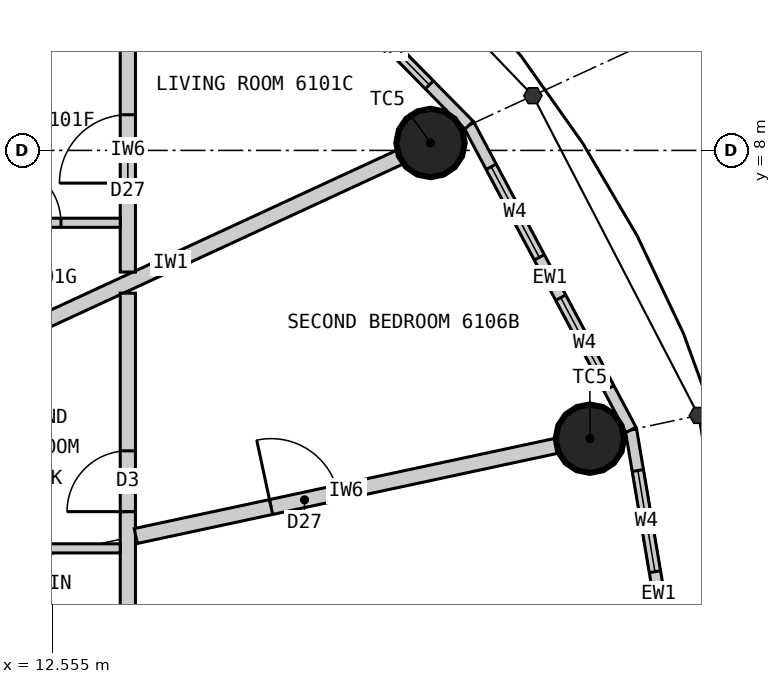
"""IFC4 building model, lengths in metres.
Left out: names, types, materials, properties, quantities, classifications, styles, units other than length and angle.
Written with IfcOpenShell. Run it as: python <this file> out.ifc"""

import sys

from ifc_helpers import new_model, si_unit, direction, frame, frame_2d, origin, origin_2d, place, context, subcontext, project, spatial, rectangle, circle, extrude, element, fill, save


model = new_model("IFC4")
c1 = context("Model", 3, precision=1e-05, world=origin(), true_north=direction((0.0, 1.0)))
c2 = subcontext(c1, "Body", "Model", "MODEL_VIEW")
j1 = project(units=[si_unit("LENGTHUNIT", "METRE"), si_unit("PLANEANGLEUNIT", "RADIAN")], contexts=[c1])
p1 = place(None, origin())
s1 = spatial("IfcSite", under=j1, at=p1, CompositionType="ELEMENT")
p2 = place(p1, origin())
s2 = spatial("IfcBuilding", under=s1, at=p2, CompositionType="ELEMENT")
p3 = place(p2, frame((0.0, 0.0, 225.9)))
s3 = spatial("IfcBuildingStorey", under=s2, at=p3, CompositionType="ELEMENT", Elevation=225.9)
for number, where, z_axis, x_axis in (
    (1, (19.629, 4.208, 0.0), (0.0, 0.0, 1.0), (1.0, 0.0, 0.0)),
    (2, (17.532, 8.098, 0.0), (0.0, 0.0, 1.0), (1.0, 0.0, 0.0)),
):
    element("IfcColumn", number, at=place(p3, frame(where, z_axis=z_axis, x_axis=x_axis)), inside=s3, PredefinedType="COLUMN", context=c2, shape_type="SweptSolid", body=[
        extrude(circle(Radius=0.45, at=origin_2d()), origin(), (0.0, 0.0, 1.0), 3.3),
    ])
p4 = place(p3, frame((20.9, 0.0, 0.0), z_axis=(0.0, 0.0, 1.0), x_axis=(-0.166538513568, 0.986034950445, 0.0)))
e3 = element("IfcWall", 3, at=p4, inside=s3, PredefinedType="ELEMENTEDWALL", context=c2, shape_type="SweptSolid", body=[
    extrude(rectangle(XDim=4.385, YDim=0.15, at=frame_2d((2.192, 0.0))), origin(), (0.0, 0.0, 1.0), 3.12),
])
p5 = place(p4, frame((0.542, 0.0, 0.9)))
e4 = element("IfcOpeningElement", 4, at=p5, cuts=e3, PredefinedType="OPENING", context=c2, shape_type="SweptSolid", body=[
    extrude(rectangle(XDim=1.35, YDim=1.9, at=frame_2d((0.675, 0.95))), frame((0.0, 0.085, 0.0), z_axis=(0.0, -1.0, 0.0), x_axis=(1.0, 0.0, 0.0)), (0.0, 0.0, 1.0), 0.17),
])
p6 = place(p4, frame((2.492, 0.0, 0.9)))
e5 = element("IfcOpeningElement", 5, at=p6, cuts=e3, PredefinedType="OPENING", context=c2, shape_type="SweptSolid", body=[
    extrude(rectangle(XDim=1.35, YDim=1.9, at=frame_2d((0.675, 0.95))), frame((0.0, 0.085, 0.0), z_axis=(0.0, -1.0, 0.0), x_axis=(1.0, 0.0, 0.0)), (0.0, 0.0, 1.0), 0.17),
])
p7 = place(p3, frame((20.17, 4.323, 0.0), z_axis=(0.0, 0.0, 1.0), x_axis=(-0.469256152955, 0.883062094597, 0.0)))
e6 = element("IfcWall", 6, at=p7, inside=s3, PredefinedType="ELEMENTEDWALL", context=c2, shape_type="SweptSolid", body=[
    extrude(rectangle(XDim=4.539, YDim=0.15, at=frame_2d((2.27, 0.0))), origin(), (0.0, 0.0, 1.0), 3.12),
])
p8 = place(p7, frame((0.62, 0.0, 0.9)))
e7 = element("IfcOpeningElement", 7, at=p8, cuts=e6, PredefinedType="OPENING", context=c2, shape_type="SweptSolid", body=[
    extrude(rectangle(XDim=1.35, YDim=1.9, at=frame_2d((0.675, 0.95))), frame((0.0, 0.085, 0.0), z_axis=(0.0, -1.0, 0.0), x_axis=(1.0, 0.0, 0.0)), (0.0, 0.0, 1.0), 0.17),
])
p9 = place(p7, frame((2.57, 0.0, 0.9)))
e8 = element("IfcOpeningElement", 8, at=p9, cuts=e6, PredefinedType="OPENING", context=c2, shape_type="SweptSolid", body=[
    extrude(rectangle(XDim=1.35, YDim=1.9, at=frame_2d((0.675, 0.95))), frame((0.0, 0.085, 0.0), z_axis=(0.0, -1.0, 0.0), x_axis=(1.0, 0.0, 0.0)), (0.0, 0.0, 1.0), 0.17),
])
p10 = place(p3, frame((18.04, 8.332, 0.0), z_axis=(0.0, 0.0, 1.0), x_axis=(-0.701527379618, 0.712642501993, 0.0)))
e9 = element("IfcWall", 9, at=p10, inside=s3, PredefinedType="ELEMENTEDWALL", context=c2, shape_type="SweptSolid", body=[
    extrude(rectangle(XDim=4.788, YDim=0.15, at=frame_2d((2.394, 0.0))), origin(), (0.0, 0.0, 1.0), 3.12),
])
p11 = place(p10, frame((0.744, 0.0, 0.9)))
e10 = element("IfcOpeningElement", 10, at=p11, cuts=e9, PredefinedType="OPENING", context=c2, shape_type="SweptSolid", body=[
    extrude(rectangle(XDim=1.35, YDim=1.9, at=frame_2d((0.675, 0.95))), frame((0.0, 0.085, 0.0), z_axis=(0.0, -1.0, 0.0), x_axis=(1.0, 0.0, 0.0)), (0.0, 0.0, 1.0), 0.17),
])
p12 = place(p10, frame((2.694, 0.0, 0.9)))
e11 = element("IfcOpeningElement", 11, at=p12, cuts=e9, PredefinedType="OPENING", context=c2, shape_type="SweptSolid", body=[
    extrude(rectangle(XDim=1.35, YDim=1.9, at=frame_2d((0.675, 0.95))), frame((0.0, 0.085, 0.0), z_axis=(0.0, -1.0, 0.0), x_axis=(1.0, 0.0, 0.0)), (0.0, 0.0, 1.0), 0.17),
])
p13 = place(p3, frame((11.1, 5.127, 0.0), z_axis=(0.0, 0.0, 1.0), x_axis=(0.907840886552, 0.419314827672, 0.0)))
e12 = element("IfcWall", 12, at=p13, inside=s3, PredefinedType="PARTITIONING", context=c2, shape_type="SweptSolid", body=[
    extrude(rectangle(XDim=6.635, YDim=0.2, at=frame_2d((3.318, 0.0))), origin(), (0.0, 0.0, 1.0), 2.32),
])
p14 = place(p3, frame((13.55, 6.4, 0.0), z_axis=(0.0, 0.0, 1.0), x_axis=(0.0, 1.0, 0.0)))
e13 = element("IfcWall", 13, at=p14, inside=s3, PredefinedType="PARTITIONING", context=c2, shape_type="SweptSolid", body=[
    extrude(rectangle(XDim=3.209, YDim=0.2, at=frame_2d((1.604, 0.0))), origin(), (0.0, 0.0, 1.0), 3.12),
])
p15 = place(p14, frame((1.17, 0.0, 0.0)))
e14 = element("IfcOpeningElement", 14, at=p15, cuts=e13, PredefinedType="OPENING", context=c2, shape_type="SweptSolid", body=[
    extrude(rectangle(XDim=0.9, YDim=2.1, at=frame_2d((0.45, 1.05))), frame((0.0, 0.11, 0.0), z_axis=(0.0, -1.0, 0.0), x_axis=(1.0, 0.0, 0.0)), (0.0, 0.0, 1.0), 0.22),
])
p16 = place(p3, frame((11.1, 7.048, 0.0), z_axis=(0.0, 0.0, 1.0), x_axis=(1.0, 0.0, 0.0)))
e15 = element("IfcWall", 15, at=p16, inside=s3, PredefinedType="PARTITIONING", context=c2, shape_type="SweptSolid", body=[
    extrude(rectangle(XDim=2.35, YDim=0.12, at=frame_2d((1.175, 0.0))), origin(), (0.0, 0.0, 1.0), 3.12),
])
p17 = place(p16, frame((0.77, 0.0, 0.0)))
e16 = element("IfcOpeningElement", 16, at=p17, cuts=e15, PredefinedType="OPENING", context=c2, shape_type="SweptSolid", body=[
    extrude(rectangle(XDim=0.8, YDim=2.1, at=frame_2d((0.4, 1.05))), frame((0.0, 0.07, 0.0), z_axis=(0.0, -1.0, 0.0), x_axis=(1.0, 0.0, 0.0)), (0.0, 0.0, 1.0), 0.14),
])
p18 = place(p3, frame((13.55, -6.122, 0.0), z_axis=(0.0, 0.0, 1.0), x_axis=(0.0, 1.0, 0.0)))
e17 = element("IfcWall", 17, at=p18, inside=s3, PredefinedType="PARTITIONING", context=c2, shape_type="SweptSolid", body=[
    extrude(rectangle(XDim=12.245, YDim=0.2, at=frame_2d((6.122, 0.0))), origin(), (0.0, 0.0, 1.0), 3.12),
])
p19 = place(p18, frame((2.07, 0.0, 0.0)))
e18 = element("IfcOpeningElement", 18, at=p19, cuts=e17, PredefinedType="OPENING", context=c2, shape_type="SweptSolid", body=[
    extrude(rectangle(XDim=0.8, YDim=2.1, at=frame_2d((0.4, 1.05))), frame((0.0, 0.11, 0.0), z_axis=(0.0, -1.0, 0.0), x_axis=(1.0, 0.0, 0.0)), (0.0, 0.0, 1.0), 0.22),
])
p20 = place(p18, frame((9.37, 0.0, 0.0)))
e19 = element("IfcOpeningElement", 19, at=p20, cuts=e17, PredefinedType="OPENING", context=c2, shape_type="SweptSolid", body=[
    extrude(rectangle(XDim=0.8, YDim=2.1, at=frame_2d((0.4, 1.05))), frame((0.0, 0.11, 0.0), z_axis=(0.0, -1.0, 0.0), x_axis=(1.0, 0.0, 0.0)), (0.0, 0.0, 1.0), 0.22),
])
p21 = place(p18, frame((5.67, 0.0, 0.0)))
e20 = element("IfcOpeningElement", 20, at=p21, cuts=e17, PredefinedType="OPENING", context=c2, shape_type="SweptSolid", body=[
    extrude(rectangle(XDim=0.9, YDim=2.1, at=frame_2d((0.45, 1.05))), frame((0.0, 0.11, 0.0), z_axis=(0.0, -1.0, 0.0), x_axis=(1.0, 0.0, 0.0)), (0.0, 0.0, 1.0), 0.22),
])
p22 = place(p3, frame((13.655, 2.927, 0.0), z_axis=(0.0, 0.0, 1.0), x_axis=(0.977790419294, 0.209585056568, 0.0)))
e21 = element("IfcWall", 21, at=p22, inside=s3, PredefinedType="PARTITIONING", context=c2, shape_type="SweptSolid", body=[
    extrude(rectangle(XDim=5.66, YDim=0.2, at=frame_2d((2.83, 0.0))), origin(), (0.0, 0.0, 1.0), 2.42),
])
p23 = place(p22, frame((1.82, 0.0, 0.0)))
e22 = element("IfcOpeningElement", 22, at=p23, cuts=e21, PredefinedType="OPENING", context=c2, shape_type="SweptSolid", body=[
    extrude(rectangle(XDim=0.9, YDim=2.1, at=frame_2d((0.45, 1.05))), frame((0.0, 0.11, 0.0), z_axis=(0.0, -1.0, 0.0), x_axis=(1.0, 0.0, 0.0)), (0.0, 0.0, 1.0), 0.22),
])
p24 = place(p3, frame((11.1, 2.764, 0.0), z_axis=(0.0, 0.0, 1.0), x_axis=(1.0, 0.0, 0.0)))
e23 = element("IfcWall", 23, at=p24, inside=s3, PredefinedType="PARTITIONING", context=c2, shape_type="SweptSolid", body=[
    extrude(rectangle(XDim=2.35, YDim=0.12, at=frame_2d((1.175, 0.0))), origin(), (0.0, 0.0, 1.0), 2.42),
])
p25 = place(p6, origin())
e24 = element("IfcWindow", 24, at=p25, inside=s3, PartitioningType="SINGLE_PANEL", PredefinedType="WINDOW", context=c2, shape_type="SweptSolid", body=[
    extrude(rectangle(XDim=1.35, YDim=1.9, at=frame_2d((0.675, 0.95))), frame((0.0, 0.03, 0.0), z_axis=(0.0, -1.0, 0.0), x_axis=(1.0, 0.0, 0.0)), (0.0, 0.0, 1.0), 0.06),
])
fill(e5, e24)
p26 = place(p8, origin())
e25 = element("IfcWindow", 25, at=p26, inside=s3, PartitioningType="SINGLE_PANEL", PredefinedType="WINDOW", context=c2, shape_type="SweptSolid", body=[
    extrude(rectangle(XDim=1.35, YDim=1.9, at=frame_2d((0.675, 0.95))), frame((0.0, 0.03, 0.0), z_axis=(0.0, -1.0, 0.0), x_axis=(1.0, 0.0, 0.0)), (0.0, 0.0, 1.0), 0.06),
])
fill(e7, e25)
p27 = place(p9, origin())
e26 = element("IfcWindow", 26, at=p27, inside=s3, PartitioningType="SINGLE_PANEL", PredefinedType="WINDOW", context=c2, shape_type="SweptSolid", body=[
    extrude(rectangle(XDim=1.35, YDim=1.9, at=frame_2d((0.675, 0.95))), frame((0.0, 0.03, 0.0), z_axis=(0.0, -1.0, 0.0), x_axis=(1.0, 0.0, 0.0)), (0.0, 0.0, 1.0), 0.06),
])
fill(e8, e26)
p28 = place(p11, origin())
e27 = element("IfcWindow", 27, at=p28, inside=s3, PartitioningType="SINGLE_PANEL", PredefinedType="WINDOW", context=c2, shape_type="SweptSolid", body=[
    extrude(rectangle(XDim=1.35, YDim=1.9, at=frame_2d((0.675, 0.95))), frame((0.0, 0.03, 0.0), z_axis=(0.0, -1.0, 0.0), x_axis=(1.0, 0.0, 0.0)), (0.0, 0.0, 1.0), 0.06),
])
fill(e10, e27)
p29 = place(p17, origin())
e28 = element("IfcDoor", 28, at=p29, inside=s3, OperationType="SINGLE_SWING_LEFT", PredefinedType="DOOR", context=c2, shape_type="SweptSolid", body=[
    extrude(rectangle(XDim=0.8, YDim=2.1, at=frame_2d((0.4, 1.05))), frame((0.0, 0.025, 0.0), z_axis=(0.0, -1.0, 0.0), x_axis=(1.0, 0.0, 0.0)), (0.0, 0.0, 1.0), 0.05),
])
fill(e16, e28)
p30 = place(p15, origin())
e29 = element("IfcDoor", 29, at=p30, inside=s3, OperationType="SINGLE_SWING_LEFT", PredefinedType="DOOR", context=c2, shape_type="SweptSolid", body=[
    extrude(rectangle(XDim=0.9, YDim=2.1, at=frame_2d((0.45, 1.05))), frame((0.0, 0.025, 0.0), z_axis=(0.0, -1.0, 0.0), x_axis=(1.0, 0.0, 0.0)), (0.0, 0.0, 1.0), 0.05),
])
fill(e14, e29)
p31 = place(p20, origin())
e30 = element("IfcDoor", 30, at=p31, inside=s3, OperationType="SINGLE_SWING_LEFT", PredefinedType="DOOR", context=c2, shape_type="SweptSolid", body=[
    extrude(rectangle(XDim=0.8, YDim=2.1, at=frame_2d((0.4, 1.05))), frame((0.0, 0.025, 0.0), z_axis=(0.0, -1.0, 0.0), x_axis=(1.0, 0.0, 0.0)), (0.0, 0.0, 1.0), 0.05),
])
fill(e19, e30)
p32 = place(p23, origin())
e31 = element("IfcDoor", 31, at=p32, inside=s3, OperationType="SINGLE_SWING_LEFT", PredefinedType="DOOR", context=c2, shape_type="SweptSolid", body=[
    extrude(rectangle(XDim=0.9, YDim=2.1, at=frame_2d((0.45, 1.05))), frame((0.0, 0.025, 0.0), z_axis=(0.0, -1.0, 0.0), x_axis=(1.0, 0.0, 0.0)), (0.0, 0.0, 1.0), 0.05),
])
fill(e22, e31)
save(model, sys.argv[1])
